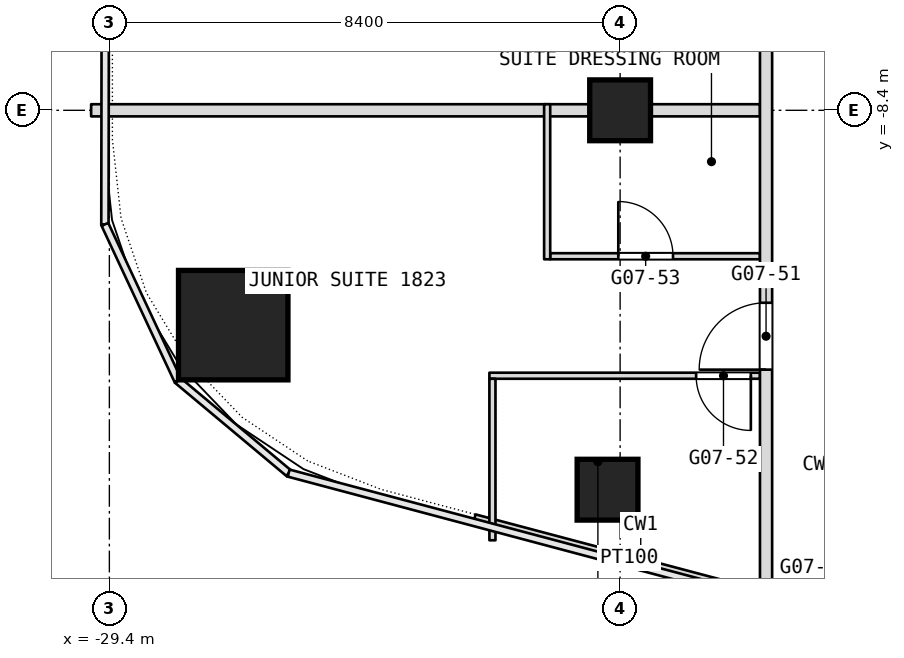
"""IFC4 building model, lengths in metres.
Left out: names, types, materials, properties, quantities, classifications, styles, units other than length and angle.
Written with IfcOpenShell. Run it as: python <this file> out.ifc"""

import sys

from ifc_helpers import new_model, si_unit, direction, frame, frame_2d, origin, origin_2d, place, context, subcontext, project, spatial, rectangle, extrude, element, fill, save


model = new_model("IFC4")
c1 = context("Model", 3, precision=1e-05, world=origin(), true_north=direction((0.0, 1.0)))
c2 = subcontext(c1, "Body", "Model", "MODEL_VIEW")
j1 = project(units=[si_unit("LENGTHUNIT", "METRE"), si_unit("PLANEANGLEUNIT", "RADIAN")], contexts=[c1])
p1 = place(None, origin())
s1 = spatial("IfcSite", under=j1, at=p1, CompositionType="ELEMENT")
p2 = place(p1, origin())
s2 = spatial("IfcBuilding", under=s1, at=p2, CompositionType="ELEMENT")
p3 = place(p2, frame((0.0, 0.0, 79.7)))
s3 = spatial("IfcBuildingStorey", under=s2, at=p3, CompositionType="ELEMENT", Elevation=79.7)
p4 = place(p3, frame((-27.363, -11.933, 0.0), z_axis=(0.0, 0.0, 1.0), x_axis=(1.0, 0.0, 0.0)))
e1 = element("IfcColumn", 1, at=p4, inside=s3, PredefinedType="COLUMN", context=c2, shape_type="SweptSolid", body=[
    extrude(rectangle(XDim=1.8, YDim=1.8, at=origin_2d()), origin(), (0.0, 0.0, 1.0), 3.6),
])
for number, where, z_axis, x_axis in (
    (2, (-21.0, -8.4, 0.0), (0.0, 0.0, 1.0), (1.0, 0.0, 0.0)),
    (3, (-21.207, -14.639, 0.0), (0.0, 0.0, 1.0), (1.0, 0.0, 0.0)),
):
    element("IfcColumn", number, at=place(p3, frame(where, z_axis=z_axis, x_axis=x_axis)), inside=s3, PredefinedType="COLUMN", context=c2, shape_type="SweptSolid", body=[
        extrude(rectangle(XDim=1.0, YDim=1.0, at=origin_2d()), origin(), (0.0, 0.0, 1.0), 3.6),
    ])
p5 = place(p3, frame((-23.39, -15.094, 0.0), z_axis=(0.0, 0.0, 1.0), x_axis=(0.966552628131, -0.256468354876, 0.0)))
e4 = element("IfcWall", 4, at=p5, inside=s3, PredefinedType="PARTITIONING", context=c2, shape_type="SweptSolid", body=[
    extrude(rectangle(XDim=5.256, YDim=0.1, at=frame_2d((2.628, 0.0))), origin(), (0.0, 0.0, 1.0), 3.34),
])
p6 = place(p3, frame((-23.15, -12.765, 0.0), z_axis=(0.0, 0.0, 1.0), x_axis=(1.0, 0.0, 0.0)))
e5 = element("IfcWall", 5, at=p6, inside=s3, PredefinedType="PARTITIONING", context=c2, shape_type="SweptSolid", body=[
    extrude(rectangle(XDim=4.45, YDim=0.1, at=frame_2d((2.225, 0.0))), origin(), (0.0, 0.0, 1.0), 3.34),
])
p7 = place(p6, frame((3.4, 0.0, 0.0)))
e6 = element("IfcOpeningElement", 6, at=p7, cuts=e5, PredefinedType="OPENING", context=c2, shape_type="SweptSolid", body=[
    extrude(rectangle(XDim=0.9, YDim=2.1, at=frame_2d((0.45, 1.05))), frame((0.0, 0.05, 0.0), z_axis=(0.0, -1.0, 0.0), x_axis=(1.0, 0.0, 0.0)), (0.0, 0.0, 1.0), 0.1),
])
p8 = place(p3, frame((-22.15, -10.8, 0.0), z_axis=(0.0, 0.0, 1.0), x_axis=(1.0, 0.0, 0.0)))
e7 = element("IfcWall", 7, at=p8, inside=s3, PredefinedType="PARTITIONING", context=c2, shape_type="SweptSolid", body=[
    extrude(rectangle(XDim=3.45, YDim=0.1, at=frame_2d((1.725, 0.0))), origin(), (0.0, 0.0, 1.0), 3.34),
])
p9 = place(p8, frame((1.12, 0.0, 0.0)))
e8 = element("IfcOpeningElement", 8, at=p9, cuts=e7, PredefinedType="OPENING", context=c2, shape_type="SweptSolid", body=[
    extrude(rectangle(XDim=0.9, YDim=2.1, at=frame_2d((0.45, 1.05))), frame((0.0, 0.05, 0.0), z_axis=(0.0, -1.0, 0.0), x_axis=(1.0, 0.0, 0.0)), (0.0, 0.0, 1.0), 0.1),
])
p10 = place(p3, frame((-29.7, -8.4, 0.0), z_axis=(0.0, 0.0, 1.0), x_axis=(1.0, 0.0, 0.0)))
e9 = element("IfcWall", 9, at=p10, inside=s3, PredefinedType="PARTITIONING", context=c2, shape_type="SweptSolid", body=[
    extrude(rectangle(XDim=11.0, YDim=0.2, at=frame_2d((5.5, 0.0))), origin(), (0.0, 0.0, 1.0), 2.84),
])
p11 = place(p3, frame((-18.6, -16.665, 0.0), z_axis=(0.0, 0.0, 1.0), x_axis=(0.0, 1.0, 0.0)))
e10 = element("IfcWall", 10, at=p11, inside=s3, PredefinedType="PARTITIONING", context=c2, shape_type="SweptSolid", body=[
    extrude(rectangle(XDim=23.565, YDim=0.2, at=frame_2d((11.782, 0.0))), origin(), (0.0, 0.0, 1.0), 3.34),
])
p12 = place(p11, frame((4.0, 0.0, 0.0)))
e11 = element("IfcOpeningElement", 11, at=p12, cuts=e10, PredefinedType="OPENING", context=c2, shape_type="SweptSolid", body=[
    extrude(rectangle(XDim=1.1, YDim=2.1, at=frame_2d((0.55, 1.05))), frame((0.0, 0.1, 0.0), z_axis=(0.0, -1.0, 0.0), x_axis=(1.0, 0.0, 0.0)), (0.0, 0.0, 1.0), 0.2),
])
p13 = place(p11, frame((11.565, 0.0, 0.0)))
e12 = element("IfcOpeningElement", 12, at=p13, cuts=e10, PredefinedType="OPENING", context=c2, shape_type="SweptSolid", body=[
    extrude(rectangle(XDim=1.8, YDim=2.1, at=frame_2d((0.9, 1.05))), frame((0.0, 0.1, 0.0), z_axis=(0.0, -1.0, 0.0), x_axis=(1.0, 0.0, 0.0)), (0.0, 0.0, 1.0), 0.2),
])
p14 = place(p11, frame((19.965, 0.0, 0.0)))
e13 = element("IfcOpeningElement", 13, at=p14, cuts=e10, PredefinedType="OPENING", context=c2, shape_type="SweptSolid", body=[
    extrude(rectangle(XDim=1.8, YDim=2.1, at=frame_2d((0.9, 1.05))), frame((0.0, 0.1, 0.0), z_axis=(0.0, -1.0, 0.0), x_axis=(1.0, 0.0, 0.0)), (0.0, 0.0, 1.0), 0.2),
])
p15 = place(p3, frame((-22.2, -10.85, 0.0), z_axis=(0.0, 0.0, 1.0), x_axis=(0.0, 1.0, 0.0)))
e14 = element("IfcWall", 14, at=p15, inside=s3, PredefinedType="PARTITIONING", context=c2, shape_type="SweptSolid", body=[
    extrude(rectangle(XDim=2.55, YDim=0.1, at=frame_2d((1.275, 0.0))), origin(), (0.0, 0.0, 1.0), 3.34),
])
p16 = place(p3, frame((-23.1, -15.471, 0.0), z_axis=(0.0, 0.0, 1.0), x_axis=(0.0, 1.0, 0.0)))
e15 = element("IfcWall", 15, at=p16, inside=s3, PredefinedType="PARTITIONING", context=c2, shape_type="SweptSolid", body=[
    extrude(rectangle(XDim=2.656, YDim=0.1, at=frame_2d((1.328, 0.0))), origin(), (0.0, 0.0, 1.0), 3.34),
])
p17 = place(p7, origin())
e16 = element("IfcDoor", 16, at=p17, inside=s3, OperationType="SINGLE_SWING_LEFT", PredefinedType="DOOR", context=c2, shape_type="SweptSolid", body=[
    extrude(rectangle(XDim=0.9, YDim=2.1, at=frame_2d((0.45, 1.05))), frame((0.0, 0.025, 0.0), z_axis=(0.0, -1.0, 0.0), x_axis=(1.0, 0.0, 0.0)), (0.0, 0.0, 1.0), 0.05),
])
fill(e6, e16)
p18 = place(p9, origin())
e17 = element("IfcDoor", 17, at=p18, inside=s3, OperationType="SINGLE_SWING_LEFT", PredefinedType="DOOR", context=c2, shape_type="SweptSolid", body=[
    extrude(rectangle(XDim=0.9, YDim=2.1, at=frame_2d((0.45, 1.05))), frame((0.0, 0.025, 0.0), z_axis=(0.0, -1.0, 0.0), x_axis=(1.0, 0.0, 0.0)), (0.0, 0.0, 1.0), 0.05),
])
fill(e8, e17)
p19 = place(p12, origin())
e18 = element("IfcDoor", 18, at=p19, inside=s3, OperationType="SINGLE_SWING_LEFT", PredefinedType="DOOR", context=c2, shape_type="SweptSolid", body=[
    extrude(rectangle(XDim=1.1, YDim=2.1, at=frame_2d((0.55, 1.05))), frame((0.0, 0.025, 0.0), z_axis=(0.0, -1.0, 0.0), x_axis=(1.0, 0.0, 0.0)), (0.0, 0.0, 1.0), 0.05),
])
fill(e11, e18)
save(model, sys.argv[1])
